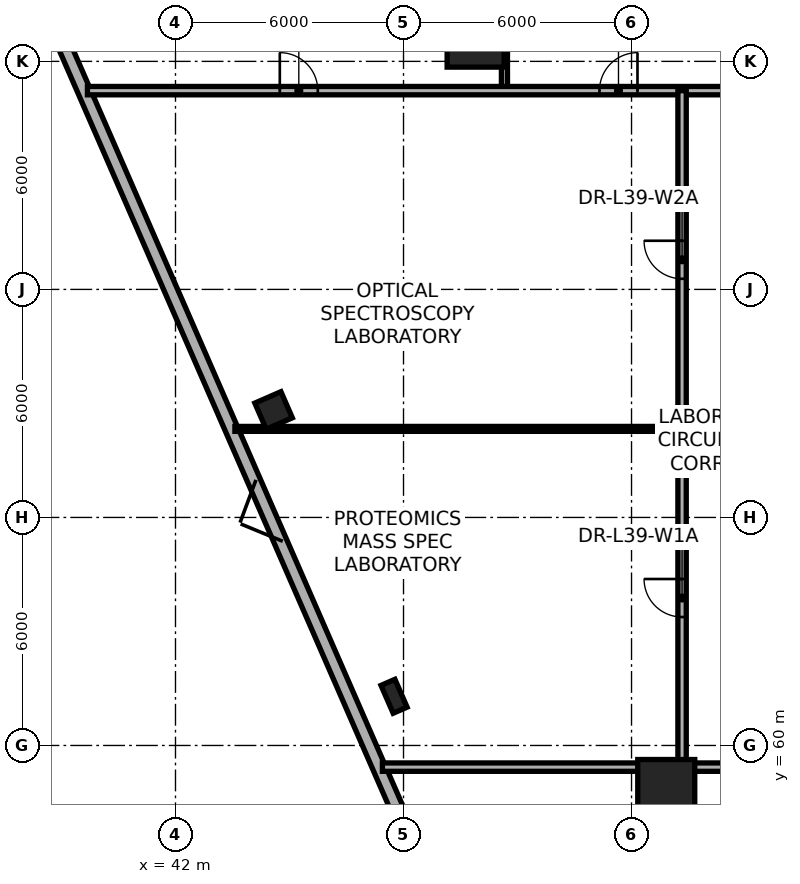
"""IFC4 building model, lengths in metres.
Left out: names, types, materials, properties, quantities, classifications, styles, units other than length and angle.
Written with IfcOpenShell. Run it as: python <this file> out.ifc"""

import sys

from ifc_helpers import new_model, si_unit, direction, frame, frame_2d, origin, origin_2d, place, context, subcontext, project, spatial, rectangle, extrude, element, fill, save


model = new_model("IFC4")
c1 = context("Model", 3, precision=1e-05, world=origin(), true_north=direction((0.0, 1.0)))
c2 = subcontext(c1, "Body", "Model", "MODEL_VIEW")
j1 = project(units=[si_unit("LENGTHUNIT", "METRE"), si_unit("PLANEANGLEUNIT", "RADIAN")], contexts=[c1])
p1 = place(None, origin())
s1 = spatial("IfcSite", under=j1, at=p1, CompositionType="ELEMENT")
p2 = place(p1, origin())
s2 = spatial("IfcBuilding", under=s1, at=p2, CompositionType="ELEMENT")
p3 = place(p2, frame((0.0, 0.0, 149.1)))
s3 = spatial("IfcBuildingStorey", under=s2, at=p3, CompositionType="ELEMENT", Elevation=149.1)
for number, where, z_axis, x_axis in (
    (1, (49.898, 78.599, 0.0), (0.0, 0.0, 1.0), (1.0, 0.0, 0.0)),
    (2, (54.914, 58.88, 0.0), (0.0, 0.0, 1.0), (1.0, 0.0, 0.0)),
):
    element("IfcColumn", number, at=place(p3, frame(where, z_axis=z_axis, x_axis=x_axis)), inside=s3, PredefinedType="COLUMN", context=c2, shape_type="SweptSolid", body=[
        extrude(rectangle(XDim=1.5, YDim=1.5, at=origin_2d()), origin(), (0.0, 0.0, 1.0), 3.65),
    ])
p4 = place(p3, frame((44.51, 68.825, 0.003), z_axis=(0.039229493406, -0.00569028488, 0.999214024874), x_axis=(0.963817976871, 0.264073100935, -0.036335998986)))
e3 = element("IfcColumn", 3, at=p4, inside=s3, PredefinedType="COLUMN", context=c2, shape_type="SweptSolid", body=[
    extrude(rectangle(XDim=0.75, YDim=0.75, at=origin_2d()), origin(), (0.0, 0.0, 1.0), 3.647),
])
p5 = place(p3, frame((47.693, 61.275, 0.003), z_axis=(0.032006476949, 0.010512587617, 0.999432374368), x_axis=(0.745657597589, 0.665613347438, -0.030880720032)))
e4 = element("IfcColumn", 4, at=p5, inside=s3, PredefinedType="PILASTER", context=c2, shape_type="SweptSolid", body=[
    extrude(rectangle(XDim=0.8, YDim=0.4, at=origin_2d()), origin(), (0.0, 0.0, 1.0), 3.646),
])
p6 = place(p3, frame((61.233, 27.594, 0.0), z_axis=(0.0, 0.0, 1.0), x_axis=(-0.399698312425, 0.916646747141, 0.0)))
e5 = element("IfcWall", 5, at=p6, inside=s3, PredefinedType="STANDARD", context=c2, shape_type="SweptSolid", body=[
    extrude(rectangle(XDim=58.525, YDim=0.34, at=frame_2d((29.262, 0.0))), origin(), (0.0, 0.0, 1.0), 0.85),
])
p7 = place(p3, frame((50.656, 77.23, 0.0), z_axis=(0.0, 0.0, 1.0), x_axis=(0.0, 1.0, 0.0)))
e6 = element("IfcWall", 6, at=p7, inside=s3, PredefinedType="PARTITIONING", context=c2, shape_type="SweptSolid", body=[
    extrude(rectangle(XDim=11.204, YDim=0.16, at=frame_2d((5.602, 0.0))), origin(), (0.0, 0.0, 1.0), 2.575),
])
p8 = place(p3, frame((39.683, 77.23, 0.0), z_axis=(0.0, 0.0, 1.0), x_axis=(1.0, 0.0, 0.0)))
e7 = element("IfcWall", 7, at=p8, inside=s3, PredefinedType="PARTITIONING", context=c2, shape_type="SweptSolid", body=[
    extrude(rectangle(XDim=52.634, YDim=0.22, at=frame_2d((26.317, 0.0))), origin(), (0.0, 0.0, 1.0), 2.575),
])
p9 = place(p8, frame((19.877, 0.0, 0.0)))
e8 = element("IfcOpeningElement", 8, at=p9, cuts=e7, PredefinedType="OPENING", context=c2, shape_type="SweptSolid", body=[
    extrude(rectangle(XDim=0.98, YDim=2.1, at=frame_2d((0.49, 1.05))), frame((0.0, 0.12, 0.0), z_axis=(0.0, -1.0, 0.0), x_axis=(1.0, 0.0, 0.0)), (0.0, 0.0, 1.0), 0.24),
])
p10 = place(p8, frame((22.702, 0.0, 0.0)))
e9 = element("IfcOpeningElement", 9, at=p10, cuts=e7, PredefinedType="OPENING", context=c2, shape_type="SweptSolid", body=[
    extrude(rectangle(XDim=0.98, YDim=2.1, at=frame_2d((0.49, 1.05))), frame((0.0, 0.12, 0.0), z_axis=(0.0, -1.0, 0.0), x_axis=(1.0, 0.0, 0.0)), (0.0, 0.0, 1.0), 0.24),
])
p11 = place(p8, frame((5.062, 0.0, 0.0)))
e10 = element("IfcOpeningElement", 10, at=p11, cuts=e7, PredefinedType="OPENING", context=c2, shape_type="SweptSolid", body=[
    extrude(rectangle(XDim=1.0, YDim=2.1, at=frame_2d((0.5, 1.05))), frame((0.0, 0.12, 0.0), z_axis=(0.0, -1.0, 0.0), x_axis=(1.0, 0.0, 0.0)), (0.0, 0.0, 1.0), 0.24),
])
p12 = place(p8, frame((13.474, 0.0, 0.0)))
e11 = element("IfcOpeningElement", 11, at=p12, cuts=e7, PredefinedType="OPENING", context=c2, shape_type="SweptSolid", body=[
    extrude(rectangle(XDim=1.0, YDim=2.1, at=frame_2d((0.5, 1.05))), frame((0.0, 0.12, 0.0), z_axis=(0.0, -1.0, 0.0), x_axis=(1.0, 0.0, 0.0)), (0.0, 0.0, 1.0), 0.24),
])
p13 = place(p8, frame((32.989, 0.0, 0.0)))
e12 = element("IfcOpeningElement", 12, at=p13, cuts=e7, PredefinedType="OPENING", context=c2, shape_type="SweptSolid", body=[
    extrude(rectangle(XDim=1.0, YDim=2.1, at=frame_2d((0.5, 1.05))), frame((0.0, 0.12, 0.0), z_axis=(0.0, -1.0, 0.0), x_axis=(1.0, 0.0, 0.0)), (0.0, 0.0, 1.0), 0.24),
])
p14 = place(p8, frame((45.373, 0.0, 0.0)))
e13 = element("IfcOpeningElement", 13, at=p14, cuts=e7, PredefinedType="OPENING", context=c2, shape_type="SweptSolid", body=[
    extrude(rectangle(XDim=1.0, YDim=2.1, at=frame_2d((0.5, 1.05))), frame((0.0, 0.12, 0.0), z_axis=(0.0, -1.0, 0.0), x_axis=(1.0, 0.0, 0.0)), (0.0, 0.0, 1.0), 0.24),
])
p15 = place(p3, frame((47.444, 59.43, 0.0), z_axis=(0.0, 0.0, 1.0), x_axis=(1.0, 0.0, 0.0)))
e14 = element("IfcWall", 14, at=p15, inside=s3, PredefinedType="PARTITIONING", context=c2, shape_type="SweptSolid", body=[
    extrude(rectangle(XDim=34.548, YDim=0.22, at=frame_2d((17.274, 0.0))), origin(), (0.0, 0.0, 1.0), 2.575),
])
p16 = place(p15, frame((10.224, 0.0, 0.0)))
e15 = element("IfcOpeningElement", 15, at=p16, cuts=e14, PredefinedType="OPENING", context=c2, shape_type="SweptSolid", body=[
    extrude(rectangle(XDim=1.5, YDim=2.2, at=frame_2d((0.75, 1.1))), frame((0.0, 0.12, 0.0), z_axis=(0.0, -1.0, 0.0), x_axis=(1.0, 0.0, 0.0)), (0.0, 0.0, 1.0), 0.24),
])
p17 = place(p15, frame((25.086, 0.0, 0.0)))
e16 = element("IfcOpeningElement", 16, at=p17, cuts=e14, PredefinedType="OPENING", context=c2, shape_type="SweptSolid", body=[
    extrude(rectangle(XDim=1.5, YDim=2.2, at=frame_2d((0.75, 1.1))), frame((0.0, 0.12, 0.0), z_axis=(0.0, -1.0, 0.0), x_axis=(1.0, 0.0, 0.0)), (0.0, 0.0, 1.0), 0.24),
])
p18 = place(p3, frame((43.563, 68.33, 0.0), z_axis=(0.0, 0.0, 1.0), x_axis=(1.0, 0.0, 0.0)))
e17 = element("IfcWall", 17, at=p18, inside=s3, PredefinedType="PARTITIONING", context=c2, shape_type="SweptSolid", body=[
    extrude(rectangle(XDim=11.767, YDim=0.13, at=frame_2d((5.883, 0.0))), origin(), (0.0, 0.0, 1.0), 2.575),
])
p19 = place(p3, frame((55.33, 59.43, 0.0), z_axis=(0.0, 0.0, 1.0), x_axis=(0.0, 1.0, 0.0)))
e18 = element("IfcWall", 18, at=p19, inside=s3, PredefinedType="PARTITIONING", context=c2, shape_type="SweptSolid", body=[
    extrude(rectangle(XDim=17.8, YDim=0.22, at=frame_2d((8.9, 0.0))), origin(), (0.0, 0.0, 1.0), 2.705),
])
p20 = place(p19, frame((3.95, 0.0, 0.0)))
e19 = element("IfcOpeningElement", 19, at=p20, cuts=e18, PredefinedType="OPENING", context=c2, shape_type="SweptSolid", body=[
    extrude(rectangle(XDim=1.0, YDim=2.1, at=frame_2d((0.5, 1.05))), frame((0.0, 0.12, 0.0), z_axis=(0.0, -1.0, 0.0), x_axis=(1.0, 0.0, 0.0)), (0.0, 0.0, 1.0), 0.24),
])
p21 = place(p19, frame((12.85, 0.0, 0.0)))
e20 = element("IfcOpeningElement", 20, at=p21, cuts=e18, PredefinedType="OPENING", context=c2, shape_type="SweptSolid", body=[
    extrude(rectangle(XDim=1.0, YDim=2.1, at=frame_2d((0.5, 1.05))), frame((0.0, 0.12, 0.0), z_axis=(0.0, -1.0, 0.0), x_axis=(1.0, 0.0, 0.0)), (0.0, 0.0, 1.0), 0.24),
])
p22 = place(p11, origin())
e21 = element("IfcDoor", 21, at=p22, inside=s3, OperationType="SINGLE_SWING_LEFT", PredefinedType="DOOR", context=c2, shape_type="SweptSolid", body=[
    extrude(rectangle(XDim=1.0, YDim=2.1, at=frame_2d((0.5, 1.05))), frame((0.0, 0.025, 0.0), z_axis=(0.0, -1.0, 0.0), x_axis=(1.0, 0.0, 0.0)), (0.0, 0.0, 1.0), 0.05),
])
fill(e10, e21)
p23 = place(p12, origin())
e22 = element("IfcDoor", 22, at=p23, inside=s3, OperationType="SINGLE_SWING_RIGHT", PredefinedType="DOOR", context=c2, shape_type="SweptSolid", body=[
    extrude(rectangle(XDim=1.0, YDim=2.1, at=frame_2d((0.5, 1.05))), frame((0.0, 0.025, 0.0), z_axis=(0.0, -1.0, 0.0), x_axis=(1.0, 0.0, 0.0)), (0.0, 0.0, 1.0), 0.05),
])
fill(e11, e22)
p24 = place(p20, origin())
e23 = element("IfcDoor", 23, at=p24, inside=s3, OperationType="SINGLE_SWING_RIGHT", PredefinedType="DOOR", context=c2, shape_type="SweptSolid", body=[
    extrude(rectangle(XDim=1.0, YDim=2.1, at=frame_2d((0.5, 1.05))), frame((0.0, 0.025, 0.0), z_axis=(0.0, -1.0, 0.0), x_axis=(1.0, 0.0, 0.0)), (0.0, 0.0, 1.0), 0.05),
])
fill(e19, e23)
p25 = place(p21, origin())
e24 = element("IfcDoor", 24, at=p25, inside=s3, OperationType="SINGLE_SWING_RIGHT", PredefinedType="DOOR", context=c2, shape_type="SweptSolid", body=[
    extrude(rectangle(XDim=1.0, YDim=2.1, at=frame_2d((0.5, 1.05))), frame((0.0, 0.025, 0.0), z_axis=(0.0, -1.0, 0.0), x_axis=(1.0, 0.0, 0.0)), (0.0, 0.0, 1.0), 0.05),
])
fill(e20, e24)
save(model, sys.argv[1])
